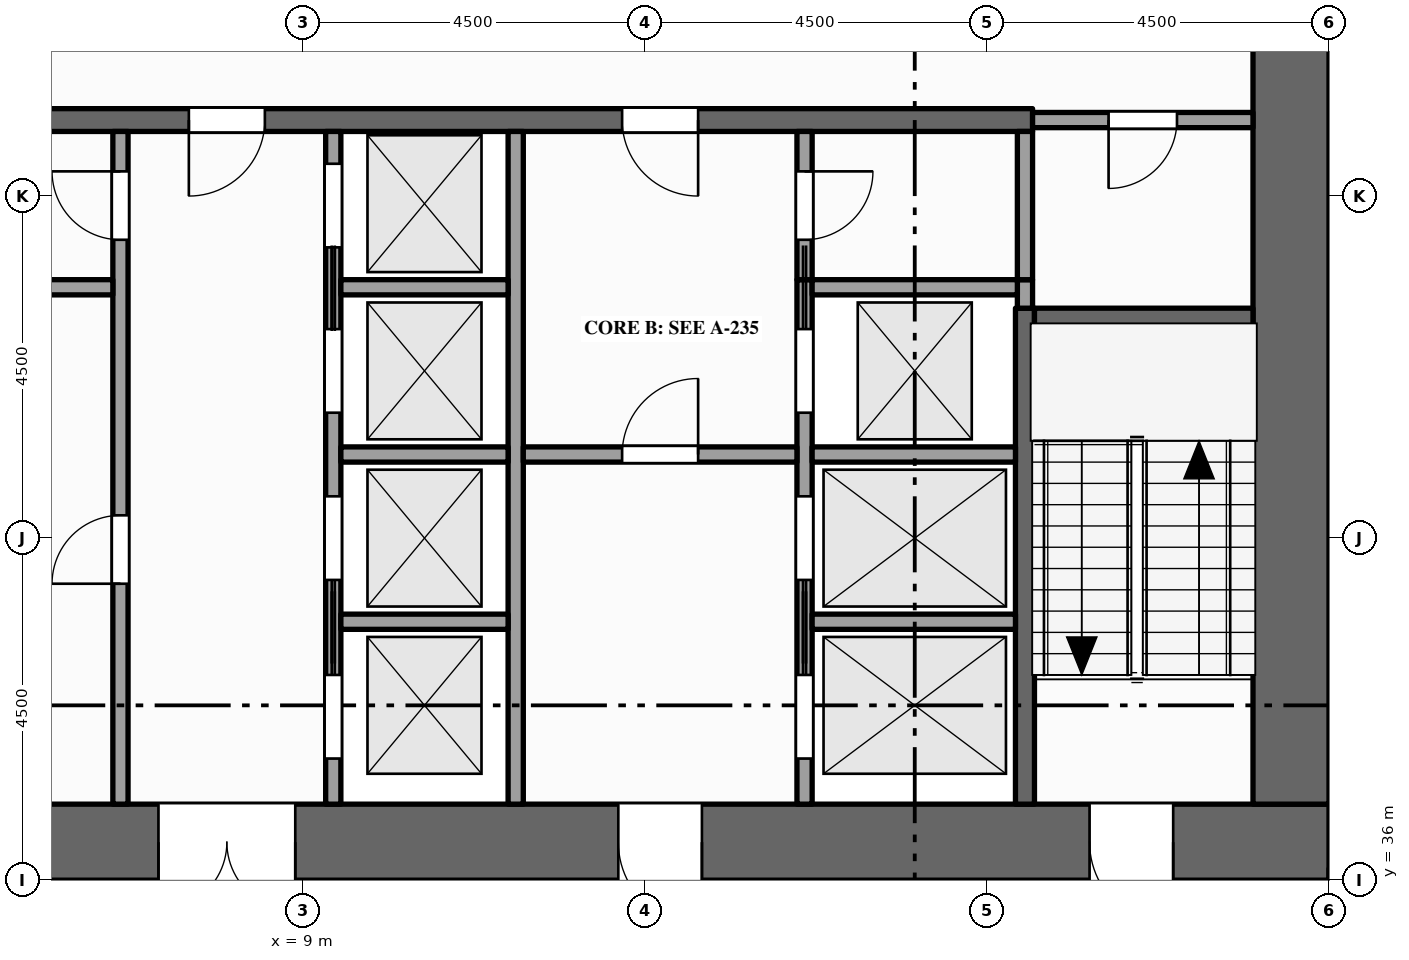
"""IFC4 building model, lengths in metres.
Left out: names, types, materials, properties, quantities, classifications, styles, units other than length and angle.
Written with IfcOpenShell. Run it as: python <this file> out.ifc"""

import sys

from ifc_helpers import new_model, si_unit, direction, frame, frame_2d, origin, place, context, subcontext, project, spatial, rectangle, extrude, element, fill, save


model = new_model("IFC4")
c1 = context("Model", 3, precision=1e-05, world=origin(), true_north=direction((0.0, 1.0)))
c2 = subcontext(c1, "Body", "Model", "MODEL_VIEW")
j1 = project(units=[si_unit("LENGTHUNIT", "METRE"), si_unit("PLANEANGLEUNIT", "RADIAN")], contexts=[c1])
p1 = place(None, origin())
s1 = spatial("IfcSite", under=j1, at=p1, CompositionType="ELEMENT")
p2 = place(p1, origin())
s2 = spatial("IfcBuilding", under=s1, at=p2, CompositionType="ELEMENT")
p3 = place(p2, frame((0.0, 0.0, 195.0)))
s3 = spatial("IfcBuildingStorey", under=s2, at=p3, CompositionType="ELEMENT", Elevation=195.0)
p4 = place(p3, frame((0.0, 36.5, -0.15), z_axis=(0.0, 0.0, 1.0), x_axis=(1.0, 0.0, 0.0)))
e1 = element("IfcWall", 1, at=p4, inside=s3, PredefinedType="SHEAR", context=c2, shape_type="SweptSolid", body=[
    extrude(rectangle(XDim=22.5, YDim=1.0, at=frame_2d((11.25, 0.0))), origin(), (0.0, 0.0, 1.0), 4.0),
])
p5 = place(p4, frame((7.1, 0.0, 0.15)))
e2 = element("IfcOpeningElement", 2, at=p5, cuts=e1, PredefinedType="OPENING", context=c2, shape_type="SweptSolid", body=[
    extrude(rectangle(XDim=1.8, YDim=2.1, at=frame_2d((0.9, 1.05))), frame((0.0, 0.51, 0.0), z_axis=(0.0, -1.0, 0.0), x_axis=(1.0, 0.0, 0.0)), (0.0, 0.0, 1.0), 1.02),
])
p6 = place(p4, frame((13.15, 0.0, 0.15)))
e3 = element("IfcOpeningElement", 3, at=p6, cuts=e1, PredefinedType="OPENING", context=c2, shape_type="SweptSolid", body=[
    extrude(rectangle(XDim=1.1, YDim=2.1, at=frame_2d((0.55, 1.05))), frame((0.0, 0.51, 0.0), z_axis=(0.0, -1.0, 0.0), x_axis=(1.0, 0.0, 0.0)), (0.0, 0.0, 1.0), 1.02),
])
p7 = place(p4, frame((2.15, 0.0, 0.15)))
e4 = element("IfcOpeningElement", 4, at=p7, cuts=e1, PredefinedType="OPENING", context=c2, shape_type="SweptSolid", body=[
    extrude(rectangle(XDim=1.1, YDim=2.1, at=frame_2d((0.55, 1.05))), frame((0.0, 0.51, 0.0), z_axis=(0.0, -1.0, 0.0), x_axis=(1.0, 0.0, 0.0)), (0.0, 0.0, 1.0), 1.02),
])
p8 = place(p4, frame((19.35, 0.0, 0.15)))
e5 = element("IfcOpeningElement", 5, at=p8, cuts=e1, PredefinedType="OPENING", context=c2, shape_type="SweptSolid", body=[
    extrude(rectangle(XDim=1.1, YDim=2.1, at=frame_2d((0.55, 1.05))), frame((0.0, 0.51, 0.0), z_axis=(0.0, -1.0, 0.0), x_axis=(1.0, 0.0, 0.0)), (0.0, 0.0, 1.0), 1.02),
])
p9 = place(p3, frame((22.0, 37.0, -0.15), z_axis=(0.0, 0.0, 1.0), x_axis=(0.0, 1.0, 0.0)))
e6 = element("IfcWall", 6, at=p9, inside=s3, PredefinedType="SHEAR", context=c2, shape_type="SweptSolid", body=[
    extrude(rectangle(XDim=11.5, YDim=1.0, at=frame_2d((5.75, 0.0))), origin(), (0.0, 0.0, 1.0), 4.0),
])
p10 = place(p3, frame((6.6, 37.0, 0.0), z_axis=(0.0, 0.0, 1.0), x_axis=(0.0, 1.0, 0.0)))
e7 = element("IfcWall", 7, at=p10, inside=s3, PredefinedType="PARTITIONING", context=c2, shape_type="SweptSolid", body=[
    extrude(rectangle(XDim=8.85, YDim=0.2, at=frame_2d((4.425, 0.0))), origin(), (0.0, 0.0, 1.0), 3.85),
])
p11 = place(p10, frame((2.9, 0.0, 0.0)))
e8 = element("IfcOpeningElement", 8, at=p11, cuts=e7, PredefinedType="OPENING", context=c2, shape_type="SweptSolid", body=[
    extrude(rectangle(XDim=0.9, YDim=2.1, at=frame_2d((0.45, 1.05))), frame((0.0, 0.11, 0.0), z_axis=(0.0, -1.0, 0.0), x_axis=(1.0, 0.0, 0.0)), (0.0, 0.0, 1.0), 0.22),
])
p12 = place(p10, frame((7.425, 0.0, 0.0)))
e9 = element("IfcOpeningElement", 9, at=p12, cuts=e7, PredefinedType="OPENING", context=c2, shape_type="SweptSolid", body=[
    extrude(rectangle(XDim=0.9, YDim=2.1, at=frame_2d((0.45, 1.05))), frame((0.0, 0.11, 0.0), z_axis=(0.0, -1.0, 0.0), x_axis=(1.0, 0.0, 0.0)), (0.0, 0.0, 1.0), 0.22),
])
p13 = place(p3, frame((9.4, 37.0, 0.0), z_axis=(0.0, 0.0, 1.0), x_axis=(0.0, 1.0, 0.0)))
e10 = element("IfcWall", 10, at=p13, inside=s3, PredefinedType="SOLIDWALL", context=c2, shape_type="SweptSolid", body=[
    extrude(rectangle(XDim=8.85, YDim=0.2, at=frame_2d((4.425, 0.0))), origin(), (0.0, 0.0, 1.0), 3.85),
])
p14 = place(p13, frame((0.6, 0.0, 0.012)))
e11 = element("IfcOpeningElement", 11, at=p14, cuts=e10, PredefinedType="OPENING", context=c2, shape_type="SweptSolid", body=[
    extrude(rectangle(XDim=1.1, YDim=2.1, at=frame_2d((0.55, 1.05))), frame((0.0, 0.11, 0.0), z_axis=(0.0, -1.0, 0.0), x_axis=(1.0, 0.0, 0.0)), (0.0, 0.0, 1.0), 0.22),
])
p15 = place(p13, frame((2.95, 0.0, 0.012)))
e12 = element("IfcOpeningElement", 12, at=p15, cuts=e10, PredefinedType="OPENING", context=c2, shape_type="SweptSolid", body=[
    extrude(rectangle(XDim=1.1, YDim=2.1, at=frame_2d((0.55, 1.05))), frame((0.0, 0.11, 0.0), z_axis=(0.0, -1.0, 0.0), x_axis=(1.0, 0.0, 0.0)), (0.0, 0.0, 1.0), 0.22),
])
p16 = place(p13, frame((5.15, 0.0, 0.012)))
e13 = element("IfcOpeningElement", 13, at=p16, cuts=e10, PredefinedType="OPENING", context=c2, shape_type="SweptSolid", body=[
    extrude(rectangle(XDim=1.1, YDim=2.1, at=frame_2d((0.55, 1.05))), frame((0.0, 0.11, 0.0), z_axis=(0.0, -1.0, 0.0), x_axis=(1.0, 0.0, 0.0)), (0.0, 0.0, 1.0), 0.22),
])
p17 = place(p13, frame((7.325, 0.0, 0.012)))
e14 = element("IfcOpeningElement", 14, at=p17, cuts=e10, PredefinedType="OPENING", context=c2, shape_type="SweptSolid", body=[
    extrude(rectangle(XDim=1.1, YDim=2.1, at=frame_2d((0.55, 1.05))), frame((0.0, 0.11, 0.0), z_axis=(0.0, -1.0, 0.0), x_axis=(1.0, 0.0, 0.0)), (0.0, 0.0, 1.0), 0.22),
])
p18 = place(p3, frame((11.8, 37.0, 0.0), z_axis=(0.0, 0.0, 1.0), x_axis=(0.0, 1.0, 0.0)))
e15 = element("IfcWall", 15, at=p18, inside=s3, PredefinedType="SOLIDWALL", context=c2, shape_type="SweptSolid", body=[
    extrude(rectangle(XDim=8.85, YDim=0.2, at=frame_2d((4.425, 0.0))), origin(), (0.0, 0.0, 1.0), 3.85),
])
p19 = place(p3, frame((15.6, 37.0, 0.0), z_axis=(0.0, 0.0, 1.0), x_axis=(0.0, 1.0, 0.0)))
e16 = element("IfcWall", 16, at=p19, inside=s3, PredefinedType="SOLIDWALL", context=c2, shape_type="SweptSolid", body=[
    extrude(rectangle(XDim=6.9, YDim=0.2, at=frame_2d((3.45, 0.0))), origin(), (0.0, 0.0, 1.0), 3.85),
])
p20 = place(p19, frame((0.6, 0.0, 0.012)))
e17 = element("IfcOpeningElement", 17, at=p20, cuts=e16, PredefinedType="OPENING", context=c2, shape_type="SweptSolid", body=[
    extrude(rectangle(XDim=1.1, YDim=2.1, at=frame_2d((0.55, 1.05))), frame((0.0, 0.11, 0.0), z_axis=(0.0, -1.0, 0.0), x_axis=(1.0, 0.0, 0.0)), (0.0, 0.0, 1.0), 0.22),
])
p21 = place(p19, frame((2.95, 0.0, 0.012)))
e18 = element("IfcOpeningElement", 18, at=p21, cuts=e16, PredefinedType="OPENING", context=c2, shape_type="SweptSolid", body=[
    extrude(rectangle(XDim=1.1, YDim=2.1, at=frame_2d((0.55, 1.05))), frame((0.0, 0.11, 0.0), z_axis=(0.0, -1.0, 0.0), x_axis=(1.0, 0.0, 0.0)), (0.0, 0.0, 1.0), 0.22),
])
p22 = place(p19, frame((5.15, 0.0, 0.012)))
e19 = element("IfcOpeningElement", 19, at=p22, cuts=e16, PredefinedType="OPENING", context=c2, shape_type="SweptSolid", body=[
    extrude(rectangle(XDim=1.1, YDim=2.1, at=frame_2d((0.55, 1.05))), frame((0.0, 0.11, 0.0), z_axis=(0.0, -1.0, 0.0), x_axis=(1.0, 0.0, 0.0)), (0.0, 0.0, 1.0), 0.22),
])
p23 = place(p3, frame((15.6, 43.9, 0.0), z_axis=(0.0, 0.0, 1.0), x_axis=(0.0, 1.0, 0.0)))
e20 = element("IfcWall", 20, at=p23, inside=s3, PredefinedType="PARTITIONING", context=c2, shape_type="SweptSolid", body=[
    extrude(rectangle(XDim=1.95, YDim=0.2, at=frame_2d((0.975, 0.0))), origin(), (0.0, 0.0, 1.0), 3.85),
])
p24 = place(p23, frame((0.525, 0.0, 0.0)))
e21 = element("IfcOpeningElement", 21, at=p24, cuts=e20, PredefinedType="OPENING", context=c2, shape_type="SweptSolid", body=[
    extrude(rectangle(XDim=0.9, YDim=2.1, at=frame_2d((0.45, 1.05))), frame((0.0, 0.11, 0.0), z_axis=(0.0, -1.0, 0.0), x_axis=(1.0, 0.0, 0.0)), (0.0, 0.0, 1.0), 0.22),
])
p25 = place(p3, frame((18.5, 37.0, 0.0), z_axis=(0.0, 0.0, 1.0), x_axis=(0.0, 1.0, 0.0)))
e22 = element("IfcWall", 22, at=p25, inside=s3, PredefinedType="SHEAR", context=c2, shape_type="SweptSolid", body=[
    extrude(rectangle(XDim=6.525, YDim=0.25, at=frame_2d((3.262, 0.0))), origin(), (0.0, 0.0, 1.0), 3.85),
])
p26 = place(p3, frame((18.5, 43.525, 0.0), z_axis=(0.0, 0.0, 1.0), x_axis=(0.0, 1.0, 0.0)))
e23 = element("IfcWall", 23, at=p26, inside=s3, PredefinedType="SOLIDWALL", context=c2, shape_type="SweptSolid", body=[
    extrude(rectangle(XDim=0.375, YDim=0.2, at=frame_2d((0.188, 0.0))), origin(), (0.0, 0.0, 1.0), 3.85),
])
p27 = place(p3, frame((18.5, 43.9, 0.0), z_axis=(0.0, 0.0, 1.0), x_axis=(0.0, 1.0, 0.0)))
e24 = element("IfcWall", 24, at=p27, inside=s3, PredefinedType="PARTITIONING", context=c2, shape_type="SweptSolid", body=[
    extrude(rectangle(XDim=1.95, YDim=0.2, at=frame_2d((0.975, 0.0))), origin(), (0.0, 0.0, 1.0), 3.85),
])
p28 = place(p3, frame((9.5, 39.4, 0.0), z_axis=(0.0, 0.0, 1.0), x_axis=(1.0, 0.0, 0.0)))
e25 = element("IfcWall", 25, at=p28, inside=s3, PredefinedType="SOLIDWALL", context=c2, shape_type="SweptSolid", body=[
    extrude(rectangle(XDim=2.2, YDim=0.2, at=frame_2d((1.1, 0.0))), origin(), (0.0, 0.0, 1.0), 3.85),
])
p29 = place(p3, frame((15.7, 39.4, 0.0), z_axis=(0.0, 0.0, 1.0), x_axis=(1.0, 0.0, 0.0)))
e26 = element("IfcWall", 26, at=p29, inside=s3, PredefinedType="SOLIDWALL", context=c2, shape_type="SweptSolid", body=[
    extrude(rectangle(XDim=2.675, YDim=0.2, at=frame_2d((1.337, 0.0))), origin(), (0.0, 0.0, 1.0), 3.85),
])
p30 = place(p3, frame((9.5, 41.6, 0.0), z_axis=(0.0, 0.0, 1.0), x_axis=(1.0, 0.0, 0.0)))
e27 = element("IfcWall", 27, at=p30, inside=s3, PredefinedType="SOLIDWALL", context=c2, shape_type="SweptSolid", body=[
    extrude(rectangle(XDim=2.2, YDim=0.2, at=frame_2d((1.1, 0.0))), origin(), (0.0, 0.0, 1.0), 3.85),
])
p31 = place(p3, frame((11.9, 41.6, 0.0), z_axis=(0.0, 0.0, 1.0), x_axis=(1.0, 0.0, 0.0)))
e28 = element("IfcWall", 28, at=p31, inside=s3, PredefinedType="PARTITIONING", context=c2, shape_type="SweptSolid", body=[
    extrude(rectangle(XDim=3.6, YDim=0.2, at=frame_2d((1.8, 0.0))), origin(), (0.0, 0.0, 1.0), 3.85),
])
p32 = place(p31, frame((1.3, 0.0, 0.0)))
e29 = element("IfcOpeningElement", 29, at=p32, cuts=e28, PredefinedType="OPENING", context=c2, shape_type="SweptSolid", body=[
    extrude(rectangle(XDim=1.0, YDim=2.1, at=frame_2d((0.5, 1.05))), frame((0.0, 0.11, 0.0), z_axis=(0.0, -1.0, 0.0), x_axis=(1.0, 0.0, 0.0)), (0.0, 0.0, 1.0), 0.22),
])
p33 = place(p3, frame((15.7, 41.6, 0.0), z_axis=(0.0, 0.0, 1.0), x_axis=(1.0, 0.0, 0.0)))
e30 = element("IfcWall", 30, at=p33, inside=s3, PredefinedType="SOLIDWALL", context=c2, shape_type="SweptSolid", body=[
    extrude(rectangle(XDim=2.675, YDim=0.2, at=frame_2d((1.337, 0.0))), origin(), (0.0, 0.0, 1.0), 3.85),
])
p34 = place(p3, frame((18.625, 43.4, 0.0), z_axis=(0.0, 0.0, 1.0), x_axis=(1.0, 0.0, 0.0)))
e31 = element("IfcWall", 31, at=p34, inside=s3, PredefinedType="SHEAR", context=c2, shape_type="SweptSolid", body=[
    extrude(rectangle(XDim=2.875, YDim=0.25, at=frame_2d((1.438, 0.0))), origin(), (0.0, 0.0, 1.0), 3.85),
])
p35 = place(p3, frame((4.3, 43.8, 0.0), z_axis=(0.0, 0.0, 1.0), x_axis=(1.0, 0.0, 0.0)))
e32 = element("IfcWall", 32, at=p35, inside=s3, PredefinedType="PARTITIONING", context=c2, shape_type="SweptSolid", body=[
    extrude(rectangle(XDim=2.2, YDim=0.2, at=frame_2d((1.1, 0.0))), origin(), (0.0, 0.0, 1.0), 3.85),
])
p36 = place(p3, frame((9.5, 43.8, 0.0), z_axis=(0.0, 0.0, 1.0), x_axis=(1.0, 0.0, 0.0)))
e33 = element("IfcWall", 33, at=p36, inside=s3, PredefinedType="SOLIDWALL", context=c2, shape_type="SweptSolid", body=[
    extrude(rectangle(XDim=2.2, YDim=0.2, at=frame_2d((1.1, 0.0))), origin(), (0.0, 0.0, 1.0), 3.85),
])
p37 = place(p3, frame((15.7, 43.8, 0.0), z_axis=(0.0, 0.0, 1.0), x_axis=(1.0, 0.0, 0.0)))
e34 = element("IfcWall", 34, at=p37, inside=s3, PredefinedType="SOLIDWALL", context=c2, shape_type="SweptSolid", body=[
    extrude(rectangle(XDim=2.7, YDim=0.2, at=frame_2d((1.35, 0.0))), origin(), (0.0, 0.0, 1.0), 3.85),
])
p38 = place(p3, frame((4.1, 46.0, 0.0), z_axis=(0.0, 0.0, 1.0), x_axis=(1.0, 0.0, 0.0)))
e35 = element("IfcWall", 35, at=p38, inside=s3, PredefinedType="SHEAR", context=c2, shape_type="SweptSolid", body=[
    extrude(rectangle(XDim=14.5, YDim=0.3, at=frame_2d((7.25, 0.0))), origin(), (0.0, 0.0, 1.0), 3.85),
])
p39 = place(p38, frame((3.4, 0.0, 0.0)))
e36 = element("IfcOpeningElement", 36, at=p39, cuts=e35, PredefinedType="OPENING", context=c2, shape_type="SweptSolid", body=[
    extrude(rectangle(XDim=1.0, YDim=2.1, at=frame_2d((0.5, 1.05))), frame((0.0, 0.16, 0.0), z_axis=(0.0, -1.0, 0.0), x_axis=(1.0, 0.0, 0.0)), (0.0, 0.0, 1.0), 0.32),
])
p40 = place(p38, frame((9.1, 0.0, 0.0)))
e37 = element("IfcOpeningElement", 37, at=p40, cuts=e35, PredefinedType="OPENING", context=c2, shape_type="SweptSolid", body=[
    extrude(rectangle(XDim=1.0, YDim=2.1, at=frame_2d((0.5, 1.05))), frame((0.0, 0.16, 0.0), z_axis=(0.0, -1.0, 0.0), x_axis=(1.0, 0.0, 0.0)), (0.0, 0.0, 1.0), 0.32),
])
p41 = place(p3, frame((18.6, 46.0, 0.0), z_axis=(0.0, 0.0, 1.0), x_axis=(1.0, 0.0, 0.0)))
e38 = element("IfcWall", 38, at=p41, inside=s3, PredefinedType="PARTITIONING", context=c2, shape_type="SweptSolid", body=[
    extrude(rectangle(XDim=2.9, YDim=0.2, at=frame_2d((1.45, 0.0))), origin(), (0.0, 0.0, 1.0), 3.85),
])
p42 = place(p41, frame((1.0, 0.0, 0.0)))
e39 = element("IfcOpeningElement", 39, at=p42, cuts=e38, PredefinedType="OPENING", context=c2, shape_type="SweptSolid", body=[
    extrude(rectangle(XDim=0.9, YDim=2.1, at=frame_2d((0.45, 1.05))), frame((0.0, 0.11, 0.0), z_axis=(0.0, -1.0, 0.0), x_axis=(1.0, 0.0, 0.0)), (0.0, 0.0, 1.0), 0.22),
])
p43 = place(p14, origin())
e40 = element("IfcDoor", 40, at=p43, inside=s3, OperationType="SLIDING_TO_RIGHT", PredefinedType="DOOR", context=c2, shape_type="SweptSolid", body=[
    extrude(rectangle(XDim=1.1, YDim=2.1, at=frame_2d((0.55, 1.05))), frame((0.0, 0.025, 0.0), z_axis=(0.0, -1.0, 0.0), x_axis=(1.0, 0.0, 0.0)), (0.0, 0.0, 1.0), 0.05),
])
fill(e11, e40)
p44 = place(p15, origin())
e41 = element("IfcDoor", 41, at=p44, inside=s3, OperationType="SLIDING_TO_LEFT", PredefinedType="DOOR", context=c2, shape_type="SweptSolid", body=[
    extrude(rectangle(XDim=1.1, YDim=2.1, at=frame_2d((0.55, 1.05))), frame((0.0, 0.025, 0.0), z_axis=(0.0, -1.0, 0.0), x_axis=(1.0, 0.0, 0.0)), (0.0, 0.0, 1.0), 0.05),
])
fill(e12, e41)
p45 = place(p16, origin())
e42 = element("IfcDoor", 42, at=p45, inside=s3, OperationType="SLIDING_TO_RIGHT", PredefinedType="DOOR", context=c2, shape_type="SweptSolid", body=[
    extrude(rectangle(XDim=1.1, YDim=2.1, at=frame_2d((0.55, 1.05))), frame((0.0, 0.025, 0.0), z_axis=(0.0, -1.0, 0.0), x_axis=(1.0, 0.0, 0.0)), (0.0, 0.0, 1.0), 0.05),
])
fill(e13, e42)
p46 = place(p17, origin())
e43 = element("IfcDoor", 43, at=p46, inside=s3, OperationType="SLIDING_TO_LEFT", PredefinedType="DOOR", context=c2, shape_type="SweptSolid", body=[
    extrude(rectangle(XDim=1.1, YDim=2.1, at=frame_2d((0.55, 1.05))), frame((0.0, 0.025, 0.0), z_axis=(0.0, -1.0, 0.0), x_axis=(1.0, 0.0, 0.0)), (0.0, 0.0, 1.0), 0.05),
])
fill(e14, e43)
p47 = place(p20, origin())
e44 = element("IfcDoor", 44, at=p47, inside=s3, OperationType="SLIDING_TO_RIGHT", PredefinedType="DOOR", context=c2, shape_type="SweptSolid", body=[
    extrude(rectangle(XDim=1.1, YDim=2.1, at=frame_2d((0.55, 1.05))), frame((0.0, 0.025, 0.0), z_axis=(0.0, -1.0, 0.0), x_axis=(1.0, 0.0, 0.0)), (0.0, 0.0, 1.0), 0.05),
])
fill(e17, e44)
p48 = place(p21, origin())
e45 = element("IfcDoor", 45, at=p48, inside=s3, OperationType="SLIDING_TO_LEFT", PredefinedType="DOOR", context=c2, shape_type="SweptSolid", body=[
    extrude(rectangle(XDim=1.1, YDim=2.1, at=frame_2d((0.55, 1.05))), frame((0.0, 0.025, 0.0), z_axis=(0.0, -1.0, 0.0), x_axis=(1.0, 0.0, 0.0)), (0.0, 0.0, 1.0), 0.05),
])
fill(e18, e45)
p49 = place(p22, origin())
e46 = element("IfcDoor", 46, at=p49, inside=s3, OperationType="SLIDING_TO_RIGHT", PredefinedType="DOOR", context=c2, shape_type="SweptSolid", body=[
    extrude(rectangle(XDim=1.1, YDim=2.1, at=frame_2d((0.55, 1.05))), frame((0.0, 0.025, 0.0), z_axis=(0.0, -1.0, 0.0), x_axis=(1.0, 0.0, 0.0)), (0.0, 0.0, 1.0), 0.05),
])
fill(e19, e46)
p50 = place(p5, origin())
e47 = element("IfcDoor", 47, at=p50, inside=s3, OperationType="DOUBLE_DOOR_SINGLE_SWING", PredefinedType="DOOR", context=c2, shape_type="SweptSolid", body=[
    extrude(rectangle(XDim=1.8, YDim=2.1, at=frame_2d((0.9, 1.05))), frame((0.0, 0.025, 0.0), z_axis=(0.0, -1.0, 0.0), x_axis=(1.0, 0.0, 0.0)), (0.0, 0.0, 1.0), 0.05),
])
fill(e2, e47)
p51 = place(p39, origin())
e48 = element("IfcDoor", 48, at=p51, inside=s3, OperationType="SINGLE_SWING_LEFT", PredefinedType="DOOR", context=c2, shape_type="SweptSolid", body=[
    extrude(rectangle(XDim=1.0, YDim=2.1, at=frame_2d((0.5, 1.05))), frame((0.0, 0.025, 0.0), z_axis=(0.0, -1.0, 0.0), x_axis=(1.0, 0.0, 0.0)), (0.0, 0.0, 1.0), 0.05),
])
fill(e36, e48)
p52 = place(p6, origin())
e49 = element("IfcDoor", 49, at=p52, inside=s3, OperationType="SINGLE_SWING_RIGHT", PredefinedType="DOOR", context=c2, shape_type="SweptSolid", body=[
    extrude(rectangle(XDim=1.1, YDim=2.1, at=frame_2d((0.55, 1.05))), frame((0.0, 0.025, 0.0), z_axis=(0.0, -1.0, 0.0), x_axis=(1.0, 0.0, 0.0)), (0.0, 0.0, 1.0), 0.05),
])
fill(e3, e49)
p53 = place(p32, origin())
e50 = element("IfcDoor", 50, at=p53, inside=s3, OperationType="SINGLE_SWING_RIGHT", PredefinedType="DOOR", context=c2, shape_type="SweptSolid", body=[
    extrude(rectangle(XDim=1.0, YDim=2.1, at=frame_2d((0.5, 1.05))), frame((0.0, 0.025, 0.0), z_axis=(0.0, -1.0, 0.0), x_axis=(1.0, 0.0, 0.0)), (0.0, 0.0, 1.0), 0.05),
])
fill(e29, e50)
p54 = place(p40, origin())
e51 = element("IfcDoor", 51, at=p54, inside=s3, OperationType="SINGLE_SWING_RIGHT", PredefinedType="DOOR", context=c2, shape_type="SweptSolid", body=[
    extrude(rectangle(XDim=1.0, YDim=2.1, at=frame_2d((0.5, 1.05))), frame((0.0, 0.025, 0.0), z_axis=(0.0, -1.0, 0.0), x_axis=(1.0, 0.0, 0.0)), (0.0, 0.0, 1.0), 0.05),
])
fill(e37, e51)
p55 = place(p8, origin())
e52 = element("IfcDoor", 52, at=p55, inside=s3, OperationType="SINGLE_SWING_RIGHT", PredefinedType="DOOR", context=c2, shape_type="SweptSolid", body=[
    extrude(rectangle(XDim=1.1, YDim=2.1, at=frame_2d((0.55, 1.05))), frame((0.0, 0.025, 0.0), z_axis=(0.0, -1.0, 0.0), x_axis=(1.0, 0.0, 0.0)), (0.0, 0.0, 1.0), 0.05),
])
fill(e5, e52)
p56 = place(p42, origin())
e53 = element("IfcDoor", 53, at=p56, inside=s3, OperationType="SINGLE_SWING_LEFT", PredefinedType="DOOR", context=c2, shape_type="SweptSolid", body=[
    extrude(rectangle(XDim=0.9, YDim=2.1, at=frame_2d((0.45, 1.05))), frame((0.0, 0.025, 0.0), z_axis=(0.0, -1.0, 0.0), x_axis=(1.0, 0.0, 0.0)), (0.0, 0.0, 1.0), 0.05),
])
fill(e39, e53)
p57 = place(p11, origin())
e54 = element("IfcDoor", 54, at=p57, inside=s3, OperationType="SINGLE_SWING_LEFT", PredefinedType="DOOR", context=c2, shape_type="SweptSolid", body=[
    extrude(rectangle(XDim=0.9, YDim=2.1, at=frame_2d((0.45, 1.05))), frame((0.0, 0.025, 0.0), z_axis=(0.0, -1.0, 0.0), x_axis=(1.0, 0.0, 0.0)), (0.0, 0.0, 1.0), 0.05),
])
fill(e8, e54)
p58 = place(p12, origin())
e55 = element("IfcDoor", 55, at=p58, inside=s3, OperationType="SINGLE_SWING_RIGHT", PredefinedType="DOOR", context=c2, shape_type="SweptSolid", body=[
    extrude(rectangle(XDim=0.9, YDim=2.1, at=frame_2d((0.45, 1.05))), frame((0.0, 0.025, 0.0), z_axis=(0.0, -1.0, 0.0), x_axis=(1.0, 0.0, 0.0)), (0.0, 0.0, 1.0), 0.05),
])
fill(e9, e55)
p59 = place(p24, origin())
e56 = element("IfcDoor", 56, at=p59, inside=s3, OperationType="SINGLE_SWING_RIGHT", PredefinedType="DOOR", context=c2, shape_type="SweptSolid", body=[
    extrude(rectangle(XDim=0.9, YDim=2.1, at=frame_2d((0.45, 1.05))), frame((0.0, 0.025, 0.0), z_axis=(0.0, -1.0, 0.0), x_axis=(1.0, 0.0, 0.0)), (0.0, 0.0, 1.0), 0.05),
])
fill(e21, e56)
save(model, sys.argv[1])
